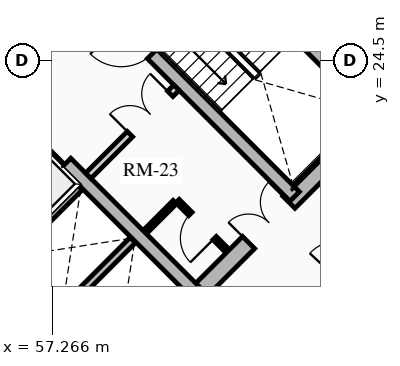
"""IFC4 building model, lengths in metres.
Left out: names, types, materials, properties, quantities, classifications, styles, units other than length and angle.
Written with IfcOpenShell. Run it as: python <this file> out.ifc"""

import sys

from ifc_helpers import new_model, si_unit, direction, frame, frame_2d, origin, place, context, subcontext, project, spatial, rectangle, extrude, source, transform, mapped, element, fill, save


model = new_model("IFC4")
c1 = context("Model", 3, precision=1e-05, world=origin(), true_north=direction((0.0, 1.0)))
c2 = subcontext(c1, "Body", "Model", "MODEL_VIEW")
j1 = project(units=[si_unit("LENGTHUNIT", "METRE"), si_unit("PLANEANGLEUNIT", "RADIAN")], contexts=[c1])
p1 = place(None, origin())
s1 = spatial("IfcSite", under=j1, at=p1, CompositionType="ELEMENT")
p2 = place(p1, origin())
s2 = spatial("IfcBuilding", under=s1, at=p2, CompositionType="ELEMENT")
p3 = place(p2, frame((0.0, 0.0, 81.79)))
s3 = spatial("IfcBuildingStorey", under=s2, at=p3, CompositionType="ELEMENT", Elevation=81.79)
for number, where, z_axis, x_axis in (
    (1, (58.737, 15.697, 0.0), (0.0, 0.0, 1.0), (-0.707, 0.707, 0.0)),
    (2, (66.303, 23.263, 0.0), (0.0, 0.0, 1.0), (-0.707, 0.707, 0.0)),
):
    element("IfcWall", number, at=place(p3, frame(where, z_axis=z_axis, x_axis=x_axis)), inside=s3, PredefinedType="SHEAR", context=c2, shape_type="SweptSolid", body=[
        extrude(rectangle(XDim=14.2, YDim=0.45, at=frame_2d((7.1, 0.0))), origin(), (0.0, 0.0, 1.0), 2.91),
    ])
p4 = place(p3, frame((58.578, 15.856, 0.0), z_axis=(0.0, 0.0, 1.0), x_axis=(0.707106781187, 0.707106781187, 0.0)))
e3 = element("IfcWall", 3, at=p4, inside=s3, PredefinedType="SHEAR", context=c2, shape_type="SweptSolid", body=[
    extrude(rectangle(XDim=10.7, YDim=0.45, at=frame_2d((5.35, 0.0))), origin(), (0.0, 0.0, 1.0), 2.91),
])
m1 = source(origin(), c2, "Body", "SweptSolid", [
    extrude(rectangle(XDim=1.5, YDim=2.02, at=frame_2d((0.75, 1.01))), frame((0.0, 0.235, 0.0), z_axis=(0.0, -1.0, 0.0), x_axis=(1.0, 0.0, 0.0)), (0.0, 0.0, 1.0), 0.47),
])
p5 = place(p4, frame((5.45, 0.0, 0.0)))
e4 = element("IfcOpeningElement", 4, at=p5, cuts=e3, PredefinedType="OPENING", context=c2, shape_type="MappedRepresentation", body=[
    mapped(m1, transform((0.0, 0.0, 0.0), x_axis=(1.0, 0.0, 0.0), y_axis=(0.0, 1.0, 0.0), z_axis=(0.0, 0.0, 1.0), scale=1.0)),
])
p6 = place(p3, frame((61.078, 18.355, 0.0), z_axis=(0.0, 0.0, 1.0), x_axis=(-0.707106781187, 0.707106781187, 0.0)))
e5 = element("IfcWall", 5, at=p6, inside=s3, PredefinedType="SHEAR", context=c2, shape_type="SweptSolid", body=[
    extrude(rectangle(XDim=13.75, YDim=0.35, at=frame_2d((6.875, 0.0))), origin(), (0.0, 0.0, 1.0), 2.91),
])
m2 = source(origin(), c2, "Body", "SweptSolid", [
    extrude(rectangle(XDim=1.1, YDim=2.015, at=frame_2d((0.55, 1.007))), frame((0.0, 0.185, 0.0), z_axis=(0.0, -1.0, 0.0), x_axis=(1.0, 0.0, 0.0)), (0.0, 0.0, 1.0), 0.37),
])
p7 = place(p6, frame((4.875, 0.0, 0.0)))
e6 = element("IfcOpeningElement", 6, at=p7, cuts=e5, PredefinedType="OPENING", context=c2, shape_type="MappedRepresentation", body=[
    mapped(m2, transform((0.0, 0.0, 0.0), x_axis=(1.0, 0.0, 0.0), y_axis=(0.0, 1.0, 0.0), z_axis=(0.0, 0.0, 1.0), scale=1.0)),
])
m3 = source(origin(), c2, "Body", "SweptSolid", [
    extrude(rectangle(XDim=1.15, YDim=2.02, at=frame_2d((0.575, 1.01))), frame((0.0, 0.185, 0.0), z_axis=(0.0, -1.0, 0.0), x_axis=(1.0, 0.0, 0.0)), (0.0, 0.0, 1.0), 0.37),
])
p8 = place(p6, frame((7.295, 0.0, 0.0)))
e7 = element("IfcOpeningElement", 7, at=p8, cuts=e5, PredefinedType="OPENING", context=c2, shape_type="MappedRepresentation", body=[
    mapped(m3, transform((0.0, 0.0, 0.0), x_axis=(1.0, 0.0, 0.0), y_axis=(0.0, 1.0, 0.0), z_axis=(0.0, 0.0, 1.0), scale=1.0)),
])
p9 = place(p3, frame((63.645, 20.922, 0.0), z_axis=(0.0, 0.0, 1.0), x_axis=(-0.707106781187, 0.707106781187, 0.0)))
e8 = element("IfcWall", 8, at=p9, inside=s3, PredefinedType="SHEAR", context=c2, shape_type="SweptSolid", body=[
    extrude(rectangle(XDim=13.75, YDim=0.35, at=frame_2d((6.875, 0.0))), origin(), (0.0, 0.0, 1.0), 2.91),
])
p10 = place(p9, frame((10.0, 0.0, 0.0)))
e9 = element("IfcOpeningElement", 9, at=p10, cuts=e8, PredefinedType="OPENING", context=c2, shape_type="MappedRepresentation", body=[
    mapped(m2, transform((0.0, 0.0, 0.0), x_axis=(1.0, 0.0, 0.0), y_axis=(0.0, 1.0, 0.0), z_axis=(0.0, 0.0, 1.0), scale=1.0)),
])
p11 = place(p9, frame((12.0, 0.0, 0.0)))
e10 = element("IfcOpeningElement", 10, at=p11, cuts=e8, PredefinedType="OPENING", context=c2, shape_type="MappedRepresentation", body=[
    mapped(m2, transform((0.0, 0.0, 0.0), x_axis=(1.0, 0.0, 0.0), y_axis=(0.0, 1.0, 0.0), z_axis=(0.0, 0.0, 1.0), scale=1.0)),
])
p12 = place(p9, frame((5.305, 0.0, 0.0)))
e11 = element("IfcOpeningElement", 11, at=p12, cuts=e8, PredefinedType="OPENING", context=c2, shape_type="MappedRepresentation", body=[
    mapped(m3, transform((0.0, 0.0, 0.0), x_axis=(1.0, 0.0, 0.0), y_axis=(0.0, 1.0, 0.0), z_axis=(0.0, 0.0, 1.0), scale=1.0)),
])
p13 = place(p3, frame((65.83, 23.107, 0.0), z_axis=(0.0, 0.0, 1.0), x_axis=(-0.707088616009, 0.707124945897, 0.0)))
e12 = element("IfcWall", 12, at=p13, inside=s3, PredefinedType="SHEAR", context=c2, shape_type="SweptSolid", body=[
    extrude(rectangle(XDim=6.72, YDim=0.35, at=frame_2d((3.36, 0.0))), origin(), (0.0, 0.0, 1.0), 2.91),
])
p14 = place(p3, frame((55.888, 19.069, 0.0), z_axis=(0.0, 0.0, 1.0), x_axis=(0.707106781187, 0.707106781187, 0.0)))
e13 = element("IfcWall", 13, at=p14, inside=s3, PredefinedType="SHEAR", context=c2, shape_type="SweptSolid", body=[
    extrude(rectangle(XDim=2.97, YDim=0.2, at=frame_2d((1.485, 0.0))), origin(), (0.0, 0.0, 1.0), 2.91),
])
p15 = place(p3, frame((57.284, 17.673, 0.0), z_axis=(0.0, 0.0, 1.0), x_axis=(0.707147878904, 0.70706568108, 0.0)))
e14 = element("IfcWall", 14, at=p15, inside=s3, PredefinedType="SHEAR", context=c2, shape_type="SweptSolid", body=[
    extrude(rectangle(XDim=2.97, YDim=0.2, at=frame_2d((1.485, 0.0))), origin(), (0.0, 0.0, 1.0), 2.91),
])
p16 = place(p3, frame((57.412, 17.97, 0.0), z_axis=(0.0, 0.0, 1.0), x_axis=(-0.707106781187, 0.707106781187, 0.0)))
e15 = element("IfcWall", 15, at=p16, inside=s3, PredefinedType="SHEAR", context=c2, shape_type="SweptSolid", body=[
    extrude(rectangle(XDim=1.735, YDim=0.2, at=frame_2d((0.867, 0.0))), origin(), (0.0, 0.0, 1.0), 2.91),
])
p17 = place(p3, frame((58.214, 21.467, 0.0), z_axis=(0.0, 0.0, 1.0), x_axis=(0.707106781187, 0.707106781187, 0.0)))
e16 = element("IfcWall", 16, at=p17, inside=s3, PredefinedType="PARTITIONING", context=c2, shape_type="SweptSolid", body=[
    extrude(rectangle(XDim=3.28, YDim=0.2, at=frame_2d((1.64, 0.0))), origin(), (0.0, 0.0, 1.0), 2.655),
])
m4 = source(origin(), c2, "Body", "SweptSolid", [
    extrude(rectangle(XDim=1.5, YDim=2.02, at=frame_2d((0.75, 1.01))), frame((0.0, 0.11, 0.0), z_axis=(0.0, -1.0, 0.0), x_axis=(1.0, 0.0, 0.0)), (0.0, 0.0, 1.0), 0.22),
])
p18 = place(p17, frame((1.55, 0.0, 0.0)))
e17 = element("IfcOpeningElement", 17, at=p18, cuts=e16, PredefinedType="OPENING", context=c2, shape_type="MappedRepresentation", body=[
    mapped(m4, transform((0.0, 0.0, 0.0), x_axis=(1.0, 0.0, 0.0), y_axis=(0.0, 1.0, 0.0), z_axis=(0.0, 0.0, 1.0), scale=1.0)),
])
p19 = place(p3, frame((54.961, 24.719, 0.0), z_axis=(0.0, 0.0, 1.0), x_axis=(0.707106781187, 0.707106781187, 0.0)))
e18 = element("IfcWall", 18, at=p19, inside=s3, PredefinedType="PARTITIONING", context=c2, shape_type="SweptSolid", body=[
    extrude(rectangle(XDim=3.28, YDim=0.2, at=frame_2d((1.64, 0.0))), origin(), (0.0, 0.0, 1.0), 2.655),
])
m5 = source(origin(), c2, "Body", "SweptSolid", [
    extrude(rectangle(XDim=0.9, YDim=2.005, at=frame_2d((0.45, 1.002))), frame((0.0, 0.11, 0.0), z_axis=(0.0, -1.0, 0.0), x_axis=(1.0, 0.0, 0.0)), (0.0, 0.0, 1.0), 0.22),
])
p20 = place(p19, frame((0.16, 0.0, 0.0)))
e19 = element("IfcOpeningElement", 19, at=p20, cuts=e18, PredefinedType="OPENING", context=c2, shape_type="MappedRepresentation", body=[
    mapped(m5, transform((0.0, 0.0, 0.0), x_axis=(1.0, 0.0, 0.0), y_axis=(0.0, 1.0, 0.0), z_axis=(0.0, 0.0, 1.0), scale=1.0)),
])
p21 = place(p3, frame((61.835, 19.529, 0.0), z_axis=(0.0, 0.0, 1.0), x_axis=(-0.707174592913, 0.707038962956, 0.0)))
e20 = element("IfcWall", 20, at=p21, inside=s3, PredefinedType="PARTITIONING", context=c2, shape_type="SweptSolid", body=[
    extrude(rectangle(XDim=1.8, YDim=0.125, at=frame_2d((0.9, 0.0))), origin(), (0.0, 0.0, 1.0), 2.655),
])
m6 = source(origin(), c2, "Body", "SweptSolid", [
    extrude(rectangle(XDim=0.9, YDim=2.005, at=frame_2d((0.45, 1.002))), frame((0.0, 0.073, 0.0), z_axis=(0.0, -1.0, 0.0), x_axis=(1.0, 0.0, 0.0)), (0.0, 0.0, 1.0), 0.145),
])
p22 = place(p21, frame((0.42, 0.0, 0.0)))
e21 = element("IfcOpeningElement", 21, at=p22, cuts=e20, PredefinedType="OPENING", context=c2, shape_type="MappedRepresentation", body=[
    mapped(m6, transform((0.0, 0.0, 0.0), x_axis=(1.0, 0.0, 0.0), y_axis=(0.0, 1.0, 0.0), z_axis=(0.0, 0.0, 1.0), scale=1.0)),
])
p23 = place(p3, frame((59.713, 19.996, 0.0), z_axis=(0.0, 0.0, 1.0), x_axis=(0.707217726, 0.706995818963, 0.0)))
e22 = element("IfcWall", 22, at=p23, inside=s3, PredefinedType="PARTITIONING", context=c2, shape_type="SweptSolid", body=[
    extrude(rectangle(XDim=1.1, YDim=0.125, at=frame_2d((0.55, 0.0))), origin(), (0.0, 0.0, 1.0), 2.655),
])
p24 = place(p3, frame((62.903, 16.667, 0.0), z_axis=(0.0, 0.0, 1.0), x_axis=(0.682371947497, 0.731005147225, 0.0)))
e23 = element("IfcWall", 23, at=p24, inside=s3, PredefinedType="PARTITIONING", context=c2, shape_type="SweptSolid", body=[
    extrude(rectangle(XDim=6.642, YDim=0.15, at=frame_2d((3.321, 0.0))), origin(), (0.0, 0.0, 1.0), 2.225),
])
m7 = source(origin(), c2, "Body", "SweptSolid", [
    extrude(rectangle(XDim=1.05, YDim=2.015, at=frame_2d((0.525, 1.007))), frame((0.0, 0.085, 0.0), z_axis=(0.0, -1.0, 0.0), x_axis=(1.0, 0.0, 0.0)), (0.0, 0.0, 1.0), 0.17),
])
p25 = place(p24, frame((2.796, 0.0, 0.0)))
e24 = element("IfcOpeningElement", 24, at=p25, cuts=e23, PredefinedType="OPENING", context=c2, shape_type="MappedRepresentation", body=[
    mapped(m7, transform((0.0, 0.0, 0.0), x_axis=(1.0, 0.0, 0.0), y_axis=(0.0, 1.0, 0.0), z_axis=(0.0, 0.0, 1.0), scale=1.0)),
])
m8 = source(origin(), c2, "Body", "SweptSolid", [
    extrude(rectangle(XDim=1.1, YDim=2.015, at=frame_2d((0.55, 1.007))), frame((0.0, 0.025, 0.0), z_axis=(0.0, -1.0, 0.0), x_axis=(1.0, 0.0, 0.0)), (0.0, 0.0, 1.0), 0.05),
])
p26 = place(p7, origin())
e25 = element("IfcDoor", 25, at=p26, inside=s3, OperationType="SLIDING_TO_LEFT", PredefinedType="DOOR", context=c2, shape_type="MappedRepresentation", body=[
    mapped(m8, transform((0.0, 0.0, 0.0), x_axis=(1.0, 0.0, 0.0), y_axis=(0.0, 1.0, 0.0), z_axis=(0.0, 0.0, 1.0), scale=1.0)),
])
fill(e6, e25)
m9 = source(origin(), c2, "Body", "SweptSolid", [
    extrude(rectangle(XDim=1.15, YDim=2.02, at=frame_2d((0.575, 1.01))), frame((0.0, 0.025, 0.0), z_axis=(0.0, -1.0, 0.0), x_axis=(1.0, 0.0, 0.0)), (0.0, 0.0, 1.0), 0.05),
])
p27 = place(p12, origin())
e26 = element("IfcDoor", 26, at=p27, inside=s3, OperationType="SINGLE_SWING_RIGHT", PredefinedType="DOOR", context=c2, shape_type="MappedRepresentation", body=[
    mapped(m9, transform((0.0, 0.0, 0.0), x_axis=(1.0, 0.0, 0.0), y_axis=(0.0, 1.0, 0.0), z_axis=(0.0, 0.0, 1.0), scale=1.0)),
])
fill(e11, e26)
m10 = source(origin(), c2, "Body", "SweptSolid", [
    extrude(rectangle(XDim=1.5, YDim=2.02, at=frame_2d((0.75, 1.01))), frame((0.0, 0.025, 0.0), z_axis=(0.0, -1.0, 0.0), x_axis=(1.0, 0.0, 0.0)), (0.0, 0.0, 1.0), 0.05),
])
p28 = place(p5, origin())
e27 = element("IfcDoor", 27, at=p28, inside=s3, OperationType="DOUBLE_DOOR_SINGLE_SWING", PredefinedType="DOOR", context=c2, shape_type="MappedRepresentation", body=[
    mapped(m10, transform((0.0, 0.0, 0.0), x_axis=(1.0, 0.0, 0.0), y_axis=(0.0, 1.0, 0.0), z_axis=(0.0, 0.0, 1.0), scale=1.0)),
])
fill(e4, e27)
p29 = place(p18, origin())
e28 = element("IfcDoor", 28, at=p29, inside=s3, OperationType="DOUBLE_DOOR_SINGLE_SWING", PredefinedType="DOOR", context=c2, shape_type="MappedRepresentation", body=[
    mapped(m10, transform((0.0, 0.0, 0.0), x_axis=(1.0, 0.0, 0.0), y_axis=(0.0, 1.0, 0.0), z_axis=(0.0, 0.0, 1.0), scale=1.0)),
])
fill(e17, e28)
m11 = source(origin(), c2, "Body", "SweptSolid", [
    extrude(rectangle(XDim=0.9, YDim=2.005, at=frame_2d((0.45, 1.002))), frame((0.0, 0.025, 0.0), z_axis=(0.0, -1.0, 0.0), x_axis=(1.0, 0.0, 0.0)), (0.0, 0.0, 1.0), 0.05),
])
p30 = place(p22, origin())
e29 = element("IfcDoor", 29, at=p30, inside=s3, OperationType="SINGLE_SWING_LEFT", PredefinedType="DOOR", context=c2, shape_type="MappedRepresentation", body=[
    mapped(m11, transform((0.0, 0.0, 0.0), x_axis=(1.0, 0.0, 0.0), y_axis=(0.0, 1.0, 0.0), z_axis=(0.0, 0.0, 1.0), scale=1.0)),
])
fill(e21, e29)
save(model, sys.argv[1])
